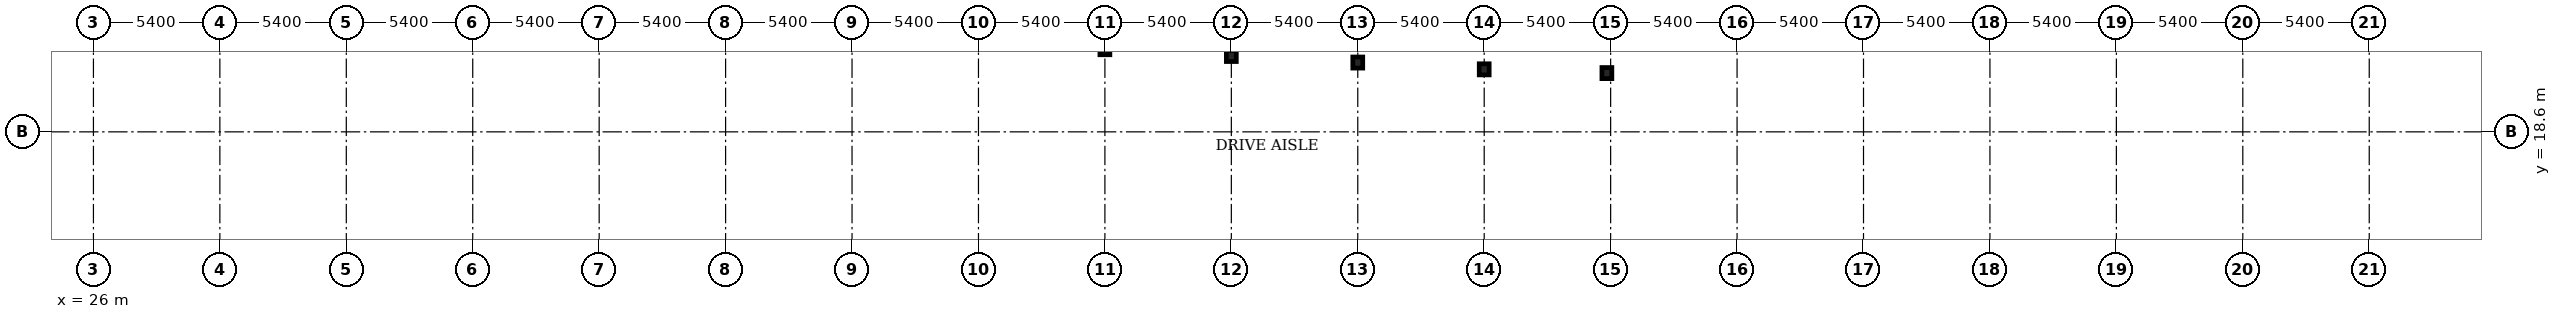
"""IFC4 building model, lengths in metres.
Left out: names, types, materials, properties, quantities, classifications, styles, units other than length and angle.
Written with IfcOpenShell. Run it as: python <this file> out.ifc"""

import sys

from ifc_helpers import new_model, si_unit, direction, frame, origin, origin_2d, place, context, subcontext, project, spatial, i_section, extrude, element, save


model = new_model("IFC4")
c1 = context("Model", 3, precision=1e-05, world=origin(), true_north=direction((0.0, 1.0)))
c2 = subcontext(c1, "Body", "Model", "MODEL_VIEW")
j1 = project(units=[si_unit("LENGTHUNIT", "METRE"), si_unit("PLANEANGLEUNIT", "RADIAN")], contexts=[c1])
p1 = place(None, origin())
s1 = spatial("IfcSite", under=j1, at=p1, CompositionType="ELEMENT")
p2 = place(p1, origin())
s2 = spatial("IfcBuilding", under=s1, at=p2, CompositionType="ELEMENT")
p3 = place(p2, frame((0.0, 0.0, -10.0)))
s3 = spatial("IfcBuildingStorey", under=s2, at=p3, CompositionType="ELEMENT", Elevation=-10.0)
for number, where, z_axis, x_axis in (
    (1, (90.64, 21.11, 0.0), (0.0, 0.0, 1.0), (1.0, 0.0, 0.0)),
    (2, (85.4, 21.27, 0.0), (0.0, 0.0, 1.0), (1.0, 0.0, 0.0)),
    (3, (80.0, 21.56, 0.0), (0.0, 0.0, 1.0), (1.0, 0.0, 0.0)),
    (4, (74.6, 21.84, 0.0), (0.0, 0.0, 1.0), (1.0, 0.0, 0.0)),
    (5, (69.2, 22.13, 0.0), (0.0, 0.0, 1.0), (1.0, 0.0, 0.0)),
):
    element("IfcColumn", number, at=place(p3, frame(where, z_axis=z_axis, x_axis=x_axis)), inside=s3, PredefinedType="COLUMN", context=c2, shape_type="SweptSolid", body=[
        extrude(i_section(OverallWidth=0.424, OverallDepth=0.474, WebThickness=0.048, FlangeThickness=0.077, FilletRadius=0.014, at=origin_2d()), origin(), (0.0, 0.0, 1.0), 5.0),
    ])
save(model, sys.argv[1])
